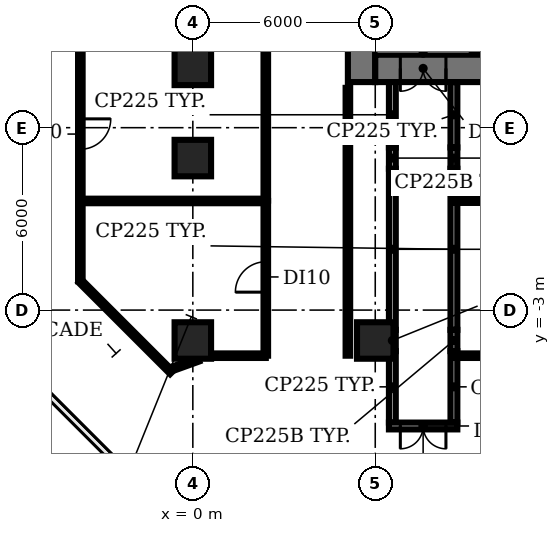
"""IFC4 building model, lengths in metres.
Left out: names, types, materials, properties, quantities, classifications, styles, units other than length and angle.
Written with IfcOpenShell. Run it as: python <this file> out.ifc"""

import sys

from ifc_helpers import new_model, si_unit, direction, frame, frame_2d, origin, origin_2d, place, context, subcontext, project, spatial, rectangle, extrude, element, fill, save


model = new_model("IFC4")
c1 = context("Model", 3, precision=1e-05, world=origin(), true_north=direction((0.0, 1.0)))
c2 = subcontext(c1, "Body", "Model", "MODEL_VIEW")
j1 = project(units=[si_unit("LENGTHUNIT", "METRE"), si_unit("PLANEANGLEUNIT", "RADIAN")], contexts=[c1])
p1 = place(None, origin())
s1 = spatial("IfcSite", under=j1, at=p1, CompositionType="ELEMENT")
p2 = place(p1, origin())
s2 = spatial("IfcBuilding", under=s1, at=p2, CompositionType="ELEMENT")
p3 = place(p2, origin())
s3 = spatial("IfcBuildingStorey", under=s2, at=p3, CompositionType="ELEMENT", Elevation=0.0)
for number, where, z_axis, x_axis in (
    (1, (0.0, -4.0, 0.0), (0.0, 0.0, 1.0), (1.0, 0.0, 0.0)),
    (2, (0.0, 2.0, 0.0), (0.0, 0.0, 1.0), (1.0, 0.0, 0.0)),
    (3, (0.0, 5.0, 0.0), (0.0, 0.0, 1.0), (1.0, 0.0, 0.0)),
    (4, (6.0, -4.0, 0.0), (0.0, 0.0, 1.0), (1.0, 0.0, 0.0)),
):
    element("IfcColumn", number, at=place(p3, frame(where, z_axis=z_axis, x_axis=x_axis)), inside=s3, PredefinedType="COLUMN", context=c2, shape_type="SweptSolid", body=[
        extrude(rectangle(XDim=1.2, YDim=1.2, at=origin_2d()), origin(), (0.0, 0.0, 1.0), 5.65),
    ])
p4 = place(p3, frame((9.275, 11.825, 0.0), z_axis=(0.0, 0.0, 1.0), x_axis=(0.0, -1.0, 0.0)))
e5 = element("IfcWall", 5, at=p4, inside=s3, PredefinedType="SHEAR", context=c2, shape_type="SweptSolid", body=[
    extrude(rectangle(XDim=6.425, YDim=0.25, at=frame_2d((3.212, 0.0))), origin(), (0.0, 0.0, 1.0), 5.65),
])
p5 = place(p4, frame((5.075, 0.0, 0.0)))
e6 = element("IfcOpeningElement", 6, at=p5, cuts=e5, PredefinedType="OPENING", context=c2, shape_type="SweptSolid", body=[
    extrude(rectangle(XDim=1.0, YDim=2.1, at=frame_2d((0.5, 1.05))), frame((0.0, 0.135, 0.0), z_axis=(0.0, -1.0, 0.0), x_axis=(1.0, 0.0, 0.0)), (0.0, 0.0, 1.0), 0.27),
])
p6 = place(p3, frame((5.55, 4.5, 0.0), z_axis=(0.0, 0.0, 1.0), x_axis=(0.0, 1.0, 0.0)))
e7 = element("IfcWall", 7, at=p6, inside=s3, PredefinedType="SHEAR", context=c2, shape_type="SweptSolid", body=[
    extrude(rectangle(XDim=21.2, YDim=0.9, at=frame_2d((10.6, 0.0))), origin(), (0.0, 0.0, 1.0), 5.65),
])
p7 = place(p6, frame((7.6, 0.0, 0.0)))
e8 = element("IfcOpeningElement", 8, at=p7, cuts=e7, PredefinedType="OPENING", context=c2, shape_type="SweptSolid", body=[
    extrude(rectangle(XDim=1.2, YDim=2.1, at=frame_2d((0.6, 1.05))), frame((0.0, 0.46, 0.0), z_axis=(0.0, -1.0, 0.0), x_axis=(1.0, 0.0, 0.0)), (0.0, 0.0, 1.0), 0.92),
])
p8 = place(p6, frame((14.15, 0.0, 0.0)))
e9 = element("IfcOpeningElement", 9, at=p8, cuts=e7, PredefinedType="OPENING", context=c2, shape_type="SweptSolid", body=[
    extrude(rectangle(XDim=1.2, YDim=2.1, at=frame_2d((0.6, 1.05))), frame((0.0, 0.46, 0.0), z_axis=(0.0, -1.0, 0.0), x_axis=(1.0, 0.0, 0.0)), (0.0, 0.0, 1.0), 0.92),
])
p9 = place(p3, frame((24.0, 4.95, 0.0), z_axis=(0.0, 0.0, 1.0), x_axis=(-1.0, 0.0, 0.0)))
e10 = element("IfcWall", 10, at=p9, inside=s3, PredefinedType="SHEAR", context=c2, shape_type="SweptSolid", body=[
    extrude(rectangle(XDim=18.0, YDim=0.9, at=frame_2d((9.0, 0.0))), origin(), (0.0, 0.0, 1.0), 5.65),
])
p10 = place(p9, frame((15.675, 0.0, 0.0)))
e11 = element("IfcOpeningElement", 11, at=p10, cuts=e10, PredefinedType="OPENING", context=c2, shape_type="SweptSolid", body=[
    extrude(rectangle(XDim=1.5, YDim=2.1, at=frame_2d((0.75, 1.05))), frame((0.0, 0.46, 0.0), z_axis=(0.0, -1.0, 0.0), x_axis=(1.0, 0.0, 0.0)), (0.0, 0.0, 1.0), 0.92),
])
p11 = place(p9, frame((0.825, 0.0, 0.0)))
e12 = element("IfcOpeningElement", 12, at=p11, cuts=e10, PredefinedType="OPENING", context=c2, shape_type="SweptSolid", body=[
    extrude(rectangle(XDim=1.5, YDim=2.1, at=frame_2d((0.75, 1.05))), frame((0.0, 0.46, 0.0), z_axis=(0.0, -1.0, 0.0), x_axis=(1.0, 0.0, 0.0)), (0.0, 0.0, 1.0), 0.92),
])
p12 = place(p9, frame((13.0, 0.0, 0.0)))
e13 = element("IfcOpeningElement", 13, at=p12, cuts=e10, PredefinedType="OPENING", context=c2, shape_type="SweptSolid", body=[
    extrude(rectangle(XDim=1.2, YDim=2.1, at=frame_2d((0.6, 1.05))), frame((0.0, 0.46, 0.0), z_axis=(0.0, -1.0, 0.0), x_axis=(1.0, 0.0, 0.0)), (0.0, 0.0, 1.0), 0.92),
])
p13 = place(p9, frame((4.9, 0.0, 0.0)))
e14 = element("IfcOpeningElement", 14, at=p13, cuts=e10, PredefinedType="OPENING", context=c2, shape_type="SweptSolid", body=[
    extrude(rectangle(XDim=1.0, YDim=2.1, at=frame_2d((0.5, 1.05))), frame((0.0, 0.46, 0.0), z_axis=(0.0, -1.0, 0.0), x_axis=(1.0, 0.0, 0.0)), (0.0, 0.0, 1.0), 0.92),
])
p14 = place(p3, frame((6.562, -6.7, 0.0), z_axis=(0.0, 0.0, 1.0), x_axis=(0.0, 1.0, 0.0)))
e15 = element("IfcWall", 15, at=p14, inside=s3, PredefinedType="PARTITIONING", context=c2, shape_type="SweptSolid", body=[
    extrude(rectangle(XDim=2.35, YDim=0.225, at=frame_2d((1.175, 0.0))), origin(), (0.0, 0.0, 1.0), 5.65),
])
p15 = place(p3, frame((6.562, -4.35, 0.0), z_axis=(0.0, 0.0, 1.0), x_axis=(0.0, 1.0, 0.0)))
e16 = element("IfcWall", 16, at=p15, inside=s3, PredefinedType="PARTITIONING", context=c2, shape_type="SweptSolid", body=[
    extrude(rectangle(XDim=0.7, YDim=0.225, at=frame_2d((0.35, 0.0))), origin(), (0.0, 0.0, 1.0), 4.65),
])
p16 = place(p3, frame((6.562, -3.65, 0.0), z_axis=(0.0, 0.0, 1.0), x_axis=(0.0, 1.0, 0.0)))
e17 = element("IfcWall", 17, at=p16, inside=s3, PredefinedType="PARTITIONING", context=c2, shape_type="SweptSolid", body=[
    extrude(rectangle(XDim=5.3, YDim=0.225, at=frame_2d((2.65, 0.0))), origin(), (0.0, 0.0, 1.0), 5.65),
])
p17 = place(p3, frame((6.562, 1.65, 0.0), z_axis=(0.0, 0.0, 1.0), x_axis=(0.0, 1.0, 0.0)))
e18 = element("IfcWall", 18, at=p17, inside=s3, PredefinedType="PARTITIONING", context=c2, shape_type="SweptSolid", body=[
    extrude(rectangle(XDim=0.7, YDim=0.225, at=frame_2d((0.35, 0.0))), origin(), (0.0, 0.0, 1.0), 4.65),
])
p18 = place(p3, frame((6.562, 2.35, 0.0), z_axis=(0.0, 0.0, 1.0), x_axis=(0.0, 1.0, 0.0)))
e19 = element("IfcWall", 19, at=p18, inside=s3, PredefinedType="PARTITIONING", context=c2, shape_type="SweptSolid", body=[
    extrude(rectangle(XDim=2.15, YDim=0.225, at=frame_2d((1.075, 0.0))), origin(), (0.0, 0.0, 1.0), 5.65),
])
p19 = place(p3, frame((8.587, -4.35, 0.0), z_axis=(0.0, 0.0, 1.0), x_axis=(0.0, -1.0, 0.0)))
e20 = element("IfcWall", 20, at=p19, inside=s3, PredefinedType="PARTITIONING", context=c2, shape_type="SweptSolid", body=[
    extrude(rectangle(XDim=2.35, YDim=0.225, at=frame_2d((1.175, 0.0))), origin(), (0.0, 0.0, 1.0), 5.65),
])
p20 = place(p3, frame((8.587, -3.65, 0.0), z_axis=(0.0, 0.0, 1.0), x_axis=(0.0, -1.0, 0.0)))
e21 = element("IfcWall", 21, at=p20, inside=s3, PredefinedType="PARTITIONING", context=c2, shape_type="SweptSolid", body=[
    extrude(rectangle(XDim=0.7, YDim=0.225, at=frame_2d((0.35, 0.0))), origin(), (0.0, 0.0, 1.0), 4.65),
])
p21 = place(p3, frame((8.587, 1.65, 0.0), z_axis=(0.0, 0.0, 1.0), x_axis=(0.0, -1.0, 0.0)))
e22 = element("IfcWall", 22, at=p21, inside=s3, PredefinedType="PARTITIONING", context=c2, shape_type="SweptSolid", body=[
    extrude(rectangle(XDim=5.3, YDim=0.225, at=frame_2d((2.65, 0.0))), origin(), (0.0, 0.0, 1.0), 5.65),
])
p22 = place(p3, frame((8.587, 2.35, 0.0), z_axis=(0.0, 0.0, 1.0), x_axis=(0.0, -1.0, 0.0)))
e23 = element("IfcWall", 23, at=p22, inside=s3, PredefinedType="PARTITIONING", context=c2, shape_type="SweptSolid", body=[
    extrude(rectangle(XDim=0.7, YDim=0.225, at=frame_2d((0.35, 0.0))), origin(), (0.0, 0.0, 1.0), 4.65),
])
p23 = place(p3, frame((8.587, 4.5, 0.0), z_axis=(0.0, 0.0, 1.0), x_axis=(0.0, -1.0, 0.0)))
e24 = element("IfcWall", 24, at=p23, inside=s3, PredefinedType="PARTITIONING", context=c2, shape_type="SweptSolid", body=[
    extrude(rectangle(XDim=2.15, YDim=0.225, at=frame_2d((1.075, 0.0))), origin(), (0.0, 0.0, 1.0), 5.65),
])
p24 = place(p3, frame((8.7, -6.812, 0.0), z_axis=(0.0, 0.0, 1.0), x_axis=(-1.0, 0.0, 0.0)))
e25 = element("IfcWall", 25, at=p24, inside=s3, PredefinedType="PARTITIONING", context=c2, shape_type="SweptSolid", body=[
    extrude(rectangle(XDim=2.25, YDim=0.225, at=frame_2d((1.125, 0.0))), origin(), (0.0, 0.0, 1.0), 5.65),
])
p25 = place(p24, frame((0.375, 0.0, 0.0)))
e26 = element("IfcOpeningElement", 26, at=p25, cuts=e25, PredefinedType="OPENING", context=c2, shape_type="SweptSolid", body=[
    extrude(rectangle(XDim=1.5, YDim=2.1, at=frame_2d((0.75, 1.05))), frame((0.0, 0.123, 0.0), z_axis=(0.0, -1.0, 0.0), x_axis=(1.0, 0.0, 0.0)), (0.0, 0.0, 1.0), 0.245),
])
p26 = place(p3, frame((-3.7, -2.05, 0.0), z_axis=(0.0, 0.0, 1.0), x_axis=(0.0, 1.0, 0.0)))
e27 = element("IfcWall", 27, at=p26, inside=s3, PredefinedType="PARTITIONING", context=c2, shape_type="SweptSolid", body=[
    extrude(rectangle(XDim=2.64, YDim=0.15, at=frame_2d((1.32, 0.0))), origin(), (0.0, 0.0, 1.0), 4.53),
])
p27 = place(p3, frame((-3.7, -2.05, 0.0), z_axis=(0.0, 0.0, 1.0), x_axis=(0.707106781187, -0.707106781187, 0.0)))
e28 = element("IfcWall", 28, at=p27, inside=s3, PredefinedType="PARTITIONING", context=c2, shape_type="SweptSolid", body=[
    extrude(rectangle(XDim=4.249, YDim=0.15, at=frame_2d((2.125, 0.0))), origin(), (0.0, 0.0, 1.0), 4.53),
])
p28 = place(p3, frame((-3.7, 0.59, 0.0), z_axis=(0.0, 0.0, 1.0), x_axis=(1.0, 0.0, 0.0)))
e29 = element("IfcWall", 29, at=p28, inside=s3, PredefinedType="PARTITIONING", context=c2, shape_type="SweptSolid", body=[
    extrude(rectangle(XDim=6.1, YDim=0.15, at=frame_2d((3.05, 0.0))), origin(), (0.0, 0.0, 1.0), 4.53),
])
p29 = place(p3, frame((-3.7, 6.14, 0.0), z_axis=(0.0, 0.0, 1.0), x_axis=(0.0, -1.0, 0.0)))
e30 = element("IfcWall", 30, at=p29, inside=s3, PredefinedType="PARTITIONING", context=c2, shape_type="SweptSolid", body=[
    extrude(rectangle(XDim=5.55, YDim=0.15, at=frame_2d((2.775, 0.0))), origin(), (0.0, 0.0, 1.0), 4.53),
])
p30 = place(p29, frame((2.85, 0.0, 0.0)))
e31 = element("IfcOpeningElement", 31, at=p30, cuts=e30, PredefinedType="OPENING", context=c2, shape_type="SweptSolid", body=[
    extrude(rectangle(XDim=1.0, YDim=2.1, at=frame_2d((0.5, 1.05))), frame((0.0, 0.085, 0.0), z_axis=(0.0, -1.0, 0.0), x_axis=(1.0, 0.0, 0.0)), (0.0, 0.0, 1.0), 0.17),
])
p31 = place(p3, frame((-0.78, -4.97, 0.0), z_axis=(0.0, 0.0, 1.0), x_axis=(0.940681994894, 0.339289528991, 0.0)))
e32 = element("IfcWall", 32, at=p31, inside=s3, PredefinedType="PARTITIONING", context=c2, shape_type="SweptSolid", body=[
    extrude(rectangle(XDim=1.031, YDim=0.15, at=frame_2d((0.516, 0.0))), origin(), (0.0, 0.0, 1.0), 4.53),
])
p32 = place(p3, frame((0.46, -4.5, 0.0), z_axis=(0.0, 0.0, 1.0), x_axis=(1.0, 0.0, 0.0)))
e33 = element("IfcWall", 33, at=p32, inside=s3, PredefinedType="PARTITIONING", context=c2, shape_type="SweptSolid", body=[
    extrude(rectangle(XDim=1.94, YDim=0.15, at=frame_2d((0.97, 0.0))), origin(), (0.0, 0.0, 1.0), 4.53),
])
p33 = place(p3, frame((2.4, -4.5, 0.0), z_axis=(0.0, 0.0, 1.0), x_axis=(0.0, 1.0, 0.0)))
e34 = element("IfcWall", 34, at=p33, inside=s3, PredefinedType="PARTITIONING", context=c2, shape_type="SweptSolid", body=[
    extrude(rectangle(XDim=5.09, YDim=0.15, at=frame_2d((2.545, 0.0))), origin(), (0.0, 0.0, 1.0), 4.53),
])
p34 = place(p33, frame((2.09, 0.0, 0.0)))
e35 = element("IfcOpeningElement", 35, at=p34, cuts=e34, PredefinedType="OPENING", context=c2, shape_type="SweptSolid", body=[
    extrude(rectangle(XDim=1.0, YDim=2.1, at=frame_2d((0.5, 1.05))), frame((0.0, 0.085, 0.0), z_axis=(0.0, -1.0, 0.0), x_axis=(1.0, 0.0, 0.0)), (0.0, 0.0, 1.0), 0.17),
])
p35 = place(p3, frame((2.4, 0.6, 0.0), z_axis=(0.0, 0.0, 1.0), x_axis=(0.0, 1.0, 0.0)))
e36 = element("IfcWall", 36, at=p35, inside=s3, PredefinedType="PARTITIONING", context=c2, shape_type="SweptSolid", body=[
    extrude(rectangle(XDim=11.1, YDim=0.15, at=frame_2d((5.55, 0.0))), origin(), (0.0, 0.0, 1.0), 4.53),
])
p36 = place(p3, frame((5.1, -4.5, 0.0), z_axis=(0.0, 0.0, 1.0), x_axis=(0.0, 1.0, 0.0)))
e37 = element("IfcWall", 37, at=p36, inside=s3, PredefinedType="PARTITIONING", context=c2, shape_type="SweptSolid", body=[
    extrude(rectangle(XDim=8.81, YDim=0.15, at=frame_2d((4.405, 0.0))), origin(), (0.0, 0.0, 1.0), 4.53),
])
p37 = place(p3, frame((8.57, -4.5, 0.0), z_axis=(0.0, 0.0, 1.0), x_axis=(1.0, 0.0, 0.0)))
e38 = element("IfcWall", 38, at=p37, inside=s3, PredefinedType="PARTITIONING", context=c2, shape_type="SweptSolid", body=[
    extrude(rectangle(XDim=2.97, YDim=0.15, at=frame_2d((1.485, 0.0))), origin(), (0.0, 0.0, 1.0), 4.53),
])
p38 = place(p3, frame((17.5, 0.6, 0.0), z_axis=(0.0, 0.0, 1.0), x_axis=(-1.0, 0.0, 0.0)))
e39 = element("IfcWall", 39, at=p38, inside=s3, PredefinedType="PARTITIONING", context=c2, shape_type="SweptSolid", body=[
    extrude(rectangle(XDim=8.93, YDim=0.15, at=frame_2d((4.465, 0.0))), origin(), (0.0, 0.0, 1.0), 4.53),
])
p39 = place(p38, frame((3.93, 0.0, 0.0)))
e40 = element("IfcOpeningElement", 40, at=p39, cuts=e39, PredefinedType="OPENING", context=c2, shape_type="SweptSolid", body=[
    extrude(rectangle(XDim=0.9, YDim=2.1, at=frame_2d((0.45, 1.05))), frame((0.0, 0.085, 0.0), z_axis=(0.0, -1.0, 0.0), x_axis=(1.0, 0.0, 0.0)), (0.0, 0.0, 1.0), 0.17),
])
p40 = place(p10, origin())
e41 = element("IfcDoor", 41, at=p40, inside=s3, OperationType="DOUBLE_DOOR_SINGLE_SWING", PredefinedType="DOOR", context=c2, shape_type="SweptSolid", body=[
    extrude(rectangle(XDim=1.5, YDim=2.1, at=frame_2d((0.75, 1.05))), frame((0.0, 0.025, 0.0), z_axis=(0.0, -1.0, 0.0), x_axis=(1.0, 0.0, 0.0)), (0.0, 0.0, 1.0), 0.05),
])
fill(e11, e41)
p41 = place(p25, origin())
e42 = element("IfcDoor", 42, at=p41, inside=s3, OperationType="DOUBLE_DOOR_SINGLE_SWING", PredefinedType="DOOR", context=c2, shape_type="SweptSolid", body=[
    extrude(rectangle(XDim=1.5, YDim=2.1, at=frame_2d((0.75, 1.05))), frame((0.0, 0.025, 0.0), z_axis=(0.0, -1.0, 0.0), x_axis=(1.0, 0.0, 0.0)), (0.0, 0.0, 1.0), 0.05),
])
fill(e26, e42)
p42 = place(p30, origin())
e43 = element("IfcDoor", 43, at=p42, inside=s3, OperationType="SINGLE_SWING_LEFT", PredefinedType="DOOR", context=c2, shape_type="SweptSolid", body=[
    extrude(rectangle(XDim=1.0, YDim=2.1, at=frame_2d((0.5, 1.05))), frame((0.0, 0.025, 0.0), z_axis=(0.0, -1.0, 0.0), x_axis=(1.0, 0.0, 0.0)), (0.0, 0.0, 1.0), 0.05),
])
fill(e31, e43)
p43 = place(p34, origin())
e44 = element("IfcDoor", 44, at=p43, inside=s3, OperationType="SINGLE_SWING_LEFT", PredefinedType="DOOR", context=c2, shape_type="SweptSolid", body=[
    extrude(rectangle(XDim=1.0, YDim=2.1, at=frame_2d((0.5, 1.05))), frame((0.0, 0.025, 0.0), z_axis=(0.0, -1.0, 0.0), x_axis=(1.0, 0.0, 0.0)), (0.0, 0.0, 1.0), 0.05),
])
fill(e35, e44)
save(model, sys.argv[1])
